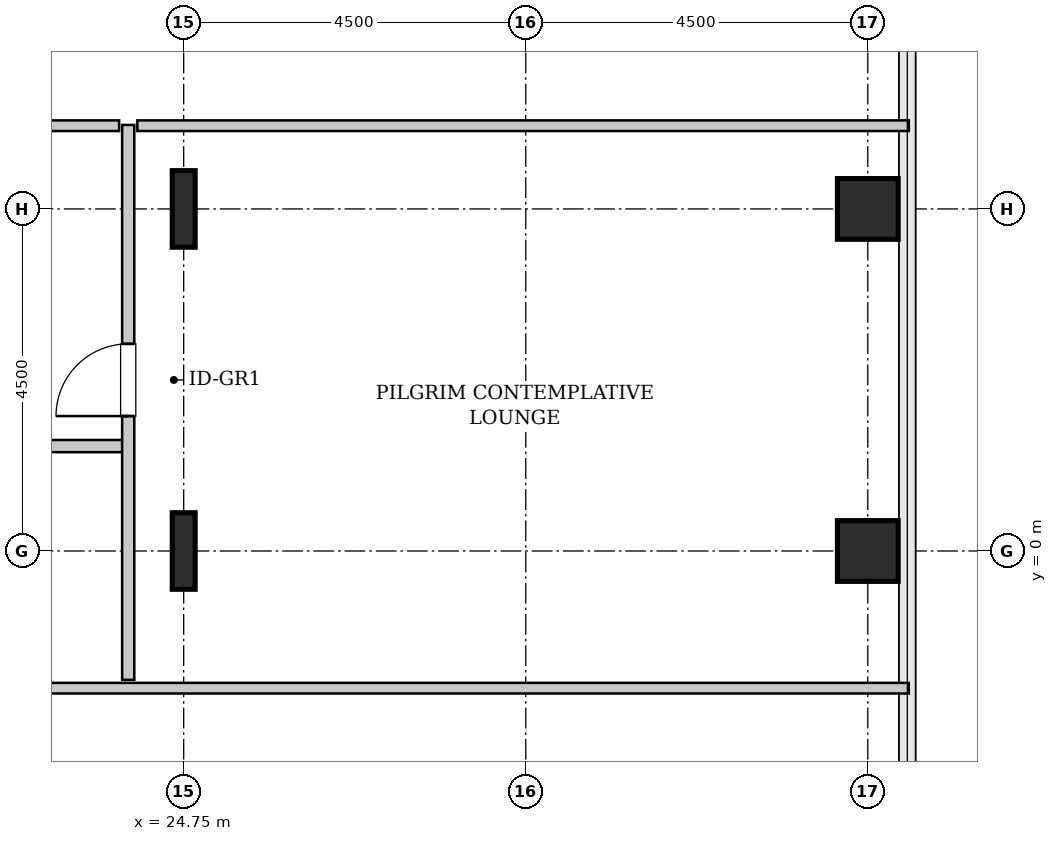
"""IFC4 building model, lengths in metres.
Left out: names, types, materials, properties, quantities, classifications, styles, units other than length and angle.
Written with IfcOpenShell. Run it as: python <this file> out.ifc"""

import sys

from ifc_helpers import new_model, si_unit, direction, frame, frame_2d, origin, origin_2d, place, context, subcontext, project, spatial, rectangle, hollow_rectangle, i_section, extrude, source, transform, mapped, element, fill, save


model = new_model("IFC4")
c1 = context("Model", 3, precision=1e-05, world=origin(), true_north=direction((0.0, 1.0)))
c2 = subcontext(c1, "Body", "Model", "MODEL_VIEW")
j1 = project(units=[si_unit("LENGTHUNIT", "METRE"), si_unit("PLANEANGLEUNIT", "RADIAN")], contexts=[c1])
p1 = place(None, origin())
s1 = spatial("IfcSite", under=j1, at=p1, CompositionType="ELEMENT")
p2 = place(p1, origin())
s2 = spatial("IfcBuilding", under=s1, at=p2, CompositionType="ELEMENT")
p3 = place(p2, frame((0.0, 0.0, 140.2)))
s3 = spatial("IfcBuildingStorey", under=s2, at=p3, CompositionType="ELEMENT", Elevation=140.2)
m1 = source(origin(), c2, "Body", "SweptSolid", [
    extrude(i_section(OverallWidth=0.302, OverallDepth=1.008, WebThickness=0.021, FlangeThickness=0.04, FilletRadius=0.03, at=origin_2d()), origin(), (0.0, 0.0, 1.0), 3.8),
])
for number, where, z_axis, x_axis in (
    (1, (24.75, 0.0, 0.0), (0.0, 0.0, 1.0), (1.0, 0.0, 0.0)),
    (2, (24.75, 4.5, 0.0), (0.0, 0.0, 1.0), (1.0, 0.0, 0.0)),
):
    element("IfcColumn", number, at=place(p3, frame(where, z_axis=z_axis, x_axis=x_axis)), inside=s3, PredefinedType="COLUMN", context=c2, shape_type="MappedRepresentation", body=[
        mapped(m1, transform((0.0, 0.0, 0.0), x_axis=(1.0, 0.0, 0.0), y_axis=(0.0, 1.0, 0.0), z_axis=(0.0, 0.0, 1.0), scale=1.0)),
    ])
m2 = source(origin(), c2, "Body", "SweptSolid", [
    extrude(hollow_rectangle(XDim=0.8, YDim=0.8, WallThickness=0.04, InnerFilletRadius=0.04, OuterFilletRadius=0.08, at=origin_2d()), origin(), (0.0, 0.0, 1.0), 3.8),
])
for number, where, z_axis, x_axis in (
    (3, (33.75, 0.0, 0.0), (0.0, 0.0, 1.0), (1.0, 0.0, 0.0)),
    (4, (33.75, 4.5, 0.0), (0.0, 0.0, 1.0), (1.0, 0.0, 0.0)),
):
    element("IfcColumn", number, at=place(p3, frame(where, z_axis=z_axis, x_axis=x_axis)), inside=s3, PredefinedType="COLUMN", context=c2, shape_type="MappedRepresentation", body=[
        mapped(m2, transform((0.0, 0.0, 0.0), x_axis=(1.0, 0.0, 0.0), y_axis=(0.0, 1.0, 0.0), z_axis=(0.0, 0.0, 1.0), scale=1.0)),
    ])
m3 = source(origin(), c2, "Body", "SweptSolid", [
    extrude(rectangle(XDim=20.43, YDim=0.14, at=frame_2d((10.215, 0.0))), origin(), (0.0, 0.0, 1.0), 3.485),
])
p4 = place(p3, frame((13.86, -1.805, 0.0), z_axis=(0.0, 0.0, 1.0), x_axis=(1.0, 0.0, 0.0)))
e5 = element("IfcWall", 5, at=p4, inside=s3, PredefinedType="PARTITIONING", context=c2, shape_type="MappedRepresentation", body=[
    mapped(m3, transform((0.0, 0.0, 0.0), x_axis=(1.0, 0.0, 0.0), y_axis=(0.0, 1.0, 0.0), z_axis=(0.0, 0.0, 1.0), scale=1.0)),
])
m4 = source(origin(), c2, "Body", "SweptSolid", [
    extrude(rectangle(XDim=10.25, YDim=0.16, at=frame_2d((5.125, 0.0))), origin(), (0.0, 0.0, 1.0), 3.485),
])
p5 = place(p3, frame((13.73, 1.38, 0.0), z_axis=(0.0, 0.0, 1.0), x_axis=(1.0, 0.0, 0.0)))
e6 = element("IfcWall", 6, at=p5, inside=s3, PredefinedType="PARTITIONING", context=c2, shape_type="MappedRepresentation", body=[
    mapped(m4, transform((0.0, 0.0, 0.0), x_axis=(1.0, 0.0, 0.0), y_axis=(0.0, 1.0, 0.0), z_axis=(0.0, 0.0, 1.0), scale=1.0)),
])
p6 = place(p5, frame((4.65, 0.0, 0.0)))
e7 = element("IfcOpeningElement", 7, at=p6, cuts=e6, PredefinedType="OPENING", context=c2, shape_type="SweptSolid", body=[
    extrude(rectangle(XDim=0.95, YDim=2.1, at=frame_2d((0.475, 1.05))), frame((0.0, 0.09, 0.0), z_axis=(0.0, -1.0, 0.0), x_axis=(1.0, 0.0, 0.0)), (0.0, 0.0, 1.0), 0.18),
])
m5 = source(origin(), c2, "Body", "SweptSolid", [
    extrude(rectangle(XDim=7.3, YDim=0.16, at=frame_2d((3.65, 0.0))), origin(), (0.0, 0.0, 1.0), 3.485),
])
p7 = place(p3, frame((24.02, -1.695, 0.0), z_axis=(0.0, 0.0, 1.0), x_axis=(0.0, 1.0, 0.0)))
e8 = element("IfcWall", 8, at=p7, inside=s3, PredefinedType="PARTITIONING", context=c2, shape_type="MappedRepresentation", body=[
    mapped(m5, transform((0.0, 0.0, 0.0), x_axis=(1.0, 0.0, 0.0), y_axis=(0.0, 1.0, 0.0), z_axis=(0.0, 0.0, 1.0), scale=1.0)),
])
p8 = place(p7, frame((3.47, 0.0, 0.0)))
e9 = element("IfcOpeningElement", 9, at=p8, cuts=e8, PredefinedType="OPENING", context=c2, shape_type="SweptSolid", body=[
    extrude(rectangle(XDim=0.95, YDim=2.1, at=frame_2d((0.475, 1.05))), frame((0.0, 0.09, 0.0), z_axis=(0.0, -1.0, 0.0), x_axis=(1.0, 0.0, 0.0)), (0.0, 0.0, 1.0), 0.18),
])
m6 = source(origin(), c2, "Body", "SweptSolid", [
    extrude(rectangle(XDim=10.17, YDim=0.14, at=frame_2d((5.085, 0.0))), origin(), (0.0, 0.0, 1.0), 3.485),
])
p9 = place(p3, frame((13.73, 5.595, 0.0), z_axis=(0.0, 0.0, 1.0), x_axis=(1.0, 0.0, 0.0)))
e10 = element("IfcWall", 10, at=p9, inside=s3, PredefinedType="PARTITIONING", context=c2, shape_type="MappedRepresentation", body=[
    mapped(m6, transform((0.0, 0.0, 0.0), x_axis=(1.0, 0.0, 0.0), y_axis=(0.0, 1.0, 0.0), z_axis=(0.0, 0.0, 1.0), scale=1.0)),
])
m7 = source(origin(), c2, "Body", "SweptSolid", [
    extrude(rectangle(XDim=10.15, YDim=0.14, at=frame_2d((5.075, 0.0))), origin(), (0.0, 0.0, 1.0), 3.485),
])
p10 = place(p3, frame((24.14, 5.595, 0.0), z_axis=(0.0, 0.0, 1.0), x_axis=(1.0, 0.0, 0.0)))
e11 = element("IfcWall", 11, at=p10, inside=s3, PredefinedType="PARTITIONING", context=c2, shape_type="MappedRepresentation", body=[
    mapped(m7, transform((0.0, 0.0, 0.0), x_axis=(1.0, 0.0, 0.0), y_axis=(0.0, 1.0, 0.0), z_axis=(0.0, 0.0, 1.0), scale=1.0)),
])
m8 = source(origin(), c2, "Body", "SweptSolid", [
    extrude(rectangle(XDim=0.95, YDim=2.1, at=frame_2d((0.475, 1.05))), frame((0.0, 0.025, 0.0), z_axis=(0.0, -1.0, 0.0), x_axis=(1.0, 0.0, 0.0)), (0.0, 0.0, 1.0), 0.05),
])
p11 = place(p8, origin())
e12 = element("IfcDoor", 12, at=p11, inside=s3, OperationType="SINGLE_SWING_LEFT", PredefinedType="DOOR", context=c2, shape_type="MappedRepresentation", body=[
    mapped(m8, transform((0.0, 0.0, 0.0), x_axis=(1.0, 0.0, 0.0), y_axis=(0.0, 1.0, 0.0), z_axis=(0.0, 0.0, 1.0), scale=1.0)),
])
fill(e9, e12)
save(model, sys.argv[1])
